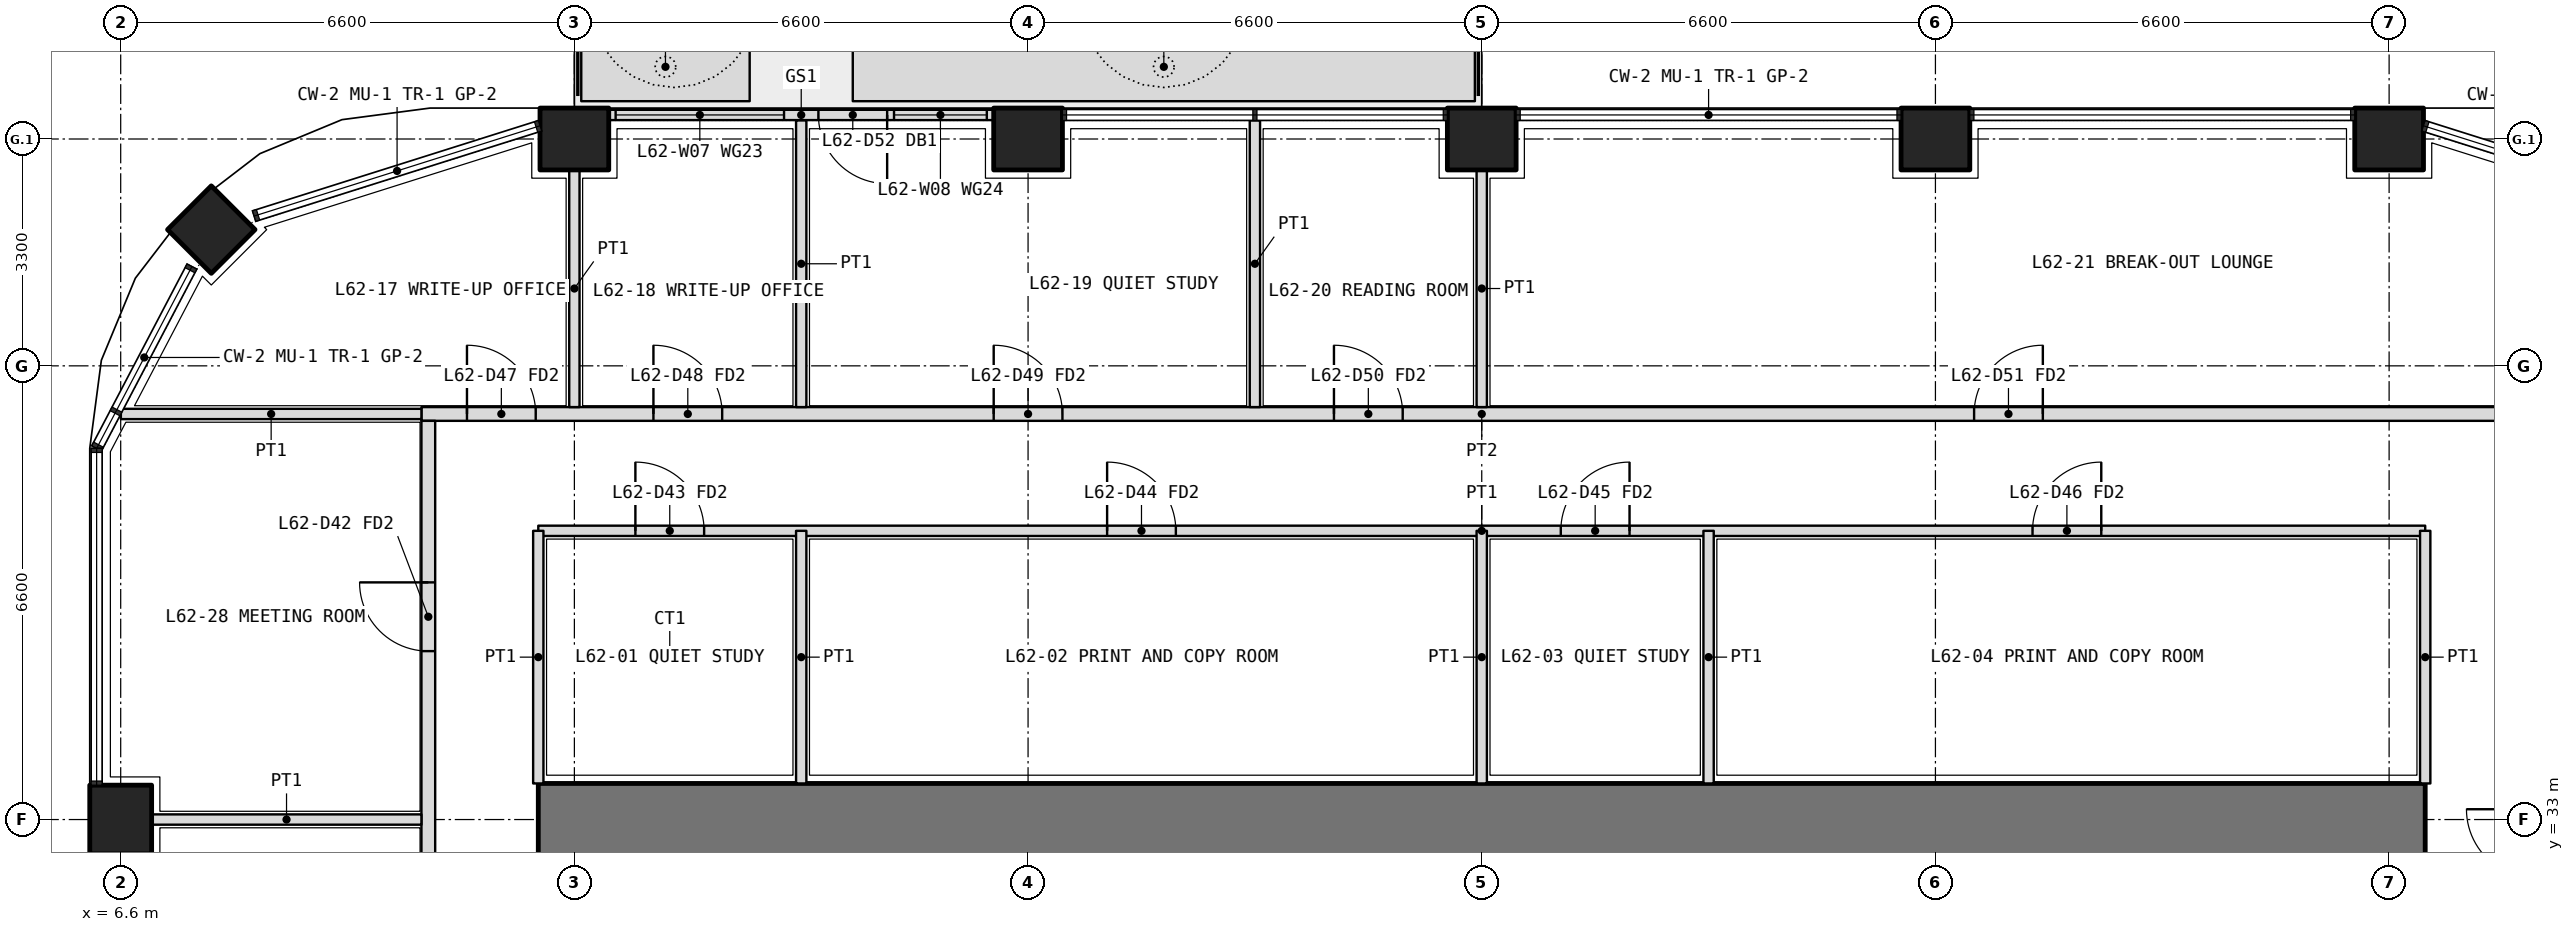
"""IFC4 building model, lengths in metres.
Left out: names, types, materials, properties, quantities, classifications, styles, units other than length and angle.
Written with IfcOpenShell. Run it as: python <this file> out.ifc"""

import sys

from ifc_helpers import new_model, si_unit, direction, frame, frame_2d, origin, origin_2d, place, context, subcontext, project, spatial, polyline, rectangle, outline, extrude, element, fill, save


model = new_model("IFC4")
c1 = context("Model", 3, precision=1e-05, world=origin(), true_north=direction((0.0, 1.0)))
c2 = subcontext(c1, "Body", "Model", "MODEL_VIEW")
j1 = project(units=[si_unit("LENGTHUNIT", "METRE"), si_unit("PLANEANGLEUNIT", "RADIAN")], contexts=[c1])
p1 = place(None, origin())
s1 = spatial("IfcSite", under=j1, at=p1, CompositionType="ELEMENT")
p2 = place(p1, origin())
s2 = spatial("IfcBuilding", under=s1, at=p2, CompositionType="ELEMENT")
p3 = place(p2, frame((0.0, 0.0, 271.2)))
s3 = spatial("IfcBuildingStorey", under=s2, at=p3, CompositionType="ELEMENT", Elevation=271.2)
p4 = place(p3, frame((7.918, 41.582, 0.0), z_axis=(0.0, 0.0, 1.0), x_axis=(0.707106781187, 0.707106781187, 0.0)))
e1 = element("IfcColumn", 1, at=p4, inside=s3, PredefinedType="COLUMN", context=c2, shape_type="SweptSolid", body=[
    extrude(rectangle(XDim=0.9, YDim=0.9, at=origin_2d()), origin(), (0.0, 0.0, 1.0), 4.2),
])
for number, where, z_axis, x_axis in (
    (2, (6.6, 33.0, 0.0), (0.0, 0.0, 1.0), (0.0, 1.0, 0.0)),
    (3, (13.2, 42.9, 0.0), (0.0, 0.0, 1.0), (1.0, 0.0, 0.0)),
    (4, (19.8, 42.9, 0.0), (0.0, 0.0, 1.0), (1.0, 0.0, 0.0)),
    (5, (26.4, 42.9, 0.0), (0.0, 0.0, 1.0), (1.0, 0.0, 0.0)),
    (6, (33.0, 42.9, 0.0), (0.0, 0.0, 1.0), (1.0, 0.0, 0.0)),
    (7, (39.6, 42.9, 0.0), (0.0, 0.0, 1.0), (1.0, 0.0, 0.0)),
):
    element("IfcColumn", number, at=place(p3, frame(where, z_axis=z_axis, x_axis=x_axis)), inside=s3, PredefinedType="COLUMN", context=c2, shape_type="SweptSolid", body=[
        extrude(rectangle(XDim=1.0, YDim=0.9, at=origin_2d()), origin(), (0.0, 0.0, 1.0), 4.2),
    ])
p5 = place(p3, origin())
e8 = element("IfcWall", 8, at=p5, inside=s3, PredefinedType="USERDEFINED", context=c2, shape_type="SweptSolid", body=[
    extrude(outline(polyline([(13.3, 43.45), (15.75, 43.45), (15.75, 44.45), (13.3, 44.45), (13.3, 43.45)]), holes=[polyline([(13.45, 43.6), (15.6, 43.6), (15.6, 44.3), (13.45, 44.3), (13.45, 43.6)])]), origin(), (0.0, 0.0, 1.0), 1.05),
])
p6 = place(p3, origin())
e9 = element("IfcWall", 9, at=p6, inside=s3, PredefinedType="USERDEFINED", context=c2, shape_type="SweptSolid", body=[
    extrude(outline(polyline([(17.25, 43.45), (26.3, 43.45), (26.3, 44.45), (17.25, 44.45), (17.25, 43.45)]), holes=[polyline([(17.4, 43.6), (26.15, 43.6), (26.15, 44.3), (17.4, 44.3), (17.4, 43.6)])]), origin(), (0.0, 0.0, 1.0), 1.05),
])
p7 = place(p3, frame((19.3, 43.25, 0.0), z_axis=(0.0, 0.0, 1.0), x_axis=(-1.0, 0.0, 0.0)))
e10 = element("IfcWall", 10, at=p7, inside=s3, PredefinedType="SOLIDWALL", context=c2, shape_type="SweptSolid", body=[
    extrude(rectangle(XDim=5.6, YDim=0.15, at=frame_2d((2.8, 0.0))), origin(), (0.0, 0.0, 1.0), 2.7),
])
p8 = place(p7, frame((1.55, 0.0, 0.0)))
e11 = element("IfcOpeningElement", 11, at=p8, cuts=e10, PredefinedType="OPENING", context=c2, shape_type="SweptSolid", body=[
    extrude(rectangle(XDim=1.0, YDim=2.4, at=frame_2d((0.5, 1.2))), frame((0.0, 0.085, 0.0), z_axis=(0.0, -1.0, 0.0), x_axis=(1.0, 0.0, 0.0)), (0.0, 0.0, 1.0), 0.17),
])
p9 = place(p7, frame((0.1, 0.0, 0.1)))
e12 = element("IfcOpeningElement", 12, at=p9, cuts=e10, PredefinedType="OPENING", context=c2, shape_type="SweptSolid", body=[
    extrude(rectangle(XDim=1.35, YDim=2.3, at=frame_2d((0.675, 1.15))), frame((0.0, 0.085, 0.0), z_axis=(0.0, -1.0, 0.0), x_axis=(1.0, 0.0, 0.0)), (0.0, 0.0, 1.0), 0.17),
])
p10 = place(p7, frame((3.05, 0.0, 0.1)))
e13 = element("IfcOpeningElement", 13, at=p10, cuts=e10, PredefinedType="OPENING", context=c2, shape_type="SweptSolid", body=[
    extrude(rectangle(XDim=2.45, YDim=2.3, at=frame_2d((1.225, 1.15))), frame((0.0, 0.085, 0.0), z_axis=(0.0, -1.0, 0.0), x_axis=(1.0, 0.0, 0.0)), (0.0, 0.0, 1.0), 0.17),
])
p11 = place(p3, frame((40.125, 33.0, 0.0), z_axis=(0.0, 0.0, 1.0), x_axis=(-1.0, 0.0, 0.0)))
e14 = element("IfcWall", 14, at=p11, inside=s3, PredefinedType="SHEAR", context=c2, shape_type="SweptSolid", body=[
    extrude(rectangle(XDim=27.45, YDim=1.05, at=frame_2d((13.725, 0.0))), origin(), (0.0, 0.0, 1.0), 4.2),
])
p12 = place(p3, frame((12.675, 37.2, 0.0), z_axis=(0.0, 0.0, 1.0), x_axis=(1.0, 0.0, 0.0)))
e15 = element("IfcWall", 15, at=p12, inside=s3, PredefinedType="PARTITIONING", context=c2, shape_type="SweptSolid", body=[
    extrude(rectangle(XDim=27.45, YDim=0.15, at=frame_2d((13.725, 0.0))), origin(), (0.0, 0.0, 1.0), 3.0),
])
p13 = place(p12, frame((1.413, 0.0, 0.0)))
e16 = element("IfcOpeningElement", 16, at=p13, cuts=e15, PredefinedType="OPENING", context=c2, shape_type="SweptSolid", body=[
    extrude(rectangle(XDim=1.0, YDim=2.1, at=frame_2d((0.5, 1.05))), frame((0.0, 0.085, 0.0), z_axis=(0.0, -1.0, 0.0), x_axis=(1.0, 0.0, 0.0)), (0.0, 0.0, 1.0), 0.17),
])
p14 = place(p12, frame((8.275, 0.0, 0.0)))
e17 = element("IfcOpeningElement", 17, at=p14, cuts=e15, PredefinedType="OPENING", context=c2, shape_type="SweptSolid", body=[
    extrude(rectangle(XDim=1.0, YDim=2.1, at=frame_2d((0.5, 1.05))), frame((0.0, 0.085, 0.0), z_axis=(0.0, -1.0, 0.0), x_axis=(1.0, 0.0, 0.0)), (0.0, 0.0, 1.0), 0.17),
])
p15 = place(p12, frame((14.875, 0.0, 0.0)))
e18 = element("IfcOpeningElement", 18, at=p15, cuts=e15, PredefinedType="OPENING", context=c2, shape_type="SweptSolid", body=[
    extrude(rectangle(XDim=1.0, YDim=2.1, at=frame_2d((0.5, 1.05))), frame((0.0, 0.085, 0.0), z_axis=(0.0, -1.0, 0.0), x_axis=(1.0, 0.0, 0.0)), (0.0, 0.0, 1.0), 0.17),
])
p16 = place(p12, frame((21.738, 0.0, 0.0)))
e19 = element("IfcOpeningElement", 19, at=p16, cuts=e15, PredefinedType="OPENING", context=c2, shape_type="SweptSolid", body=[
    extrude(rectangle(XDim=1.0, YDim=2.1, at=frame_2d((0.5, 1.05))), frame((0.0, 0.085, 0.0), z_axis=(0.0, -1.0, 0.0), x_axis=(1.0, 0.0, 0.0)), (0.0, 0.0, 1.0), 0.17),
])
for number, where, z_axis, x_axis in (
    (20, (12.675, 33.525, 0.0), (0.0, 0.0, 1.0), (0.0, 1.0, 0.0)),
    (21, (40.125, 33.525, 0.0), (0.0, 0.0, 1.0), (0.0, 1.0, 0.0)),
):
    element("IfcWall", number, at=place(p3, frame(where, z_axis=z_axis, x_axis=x_axis)), inside=s3, PredefinedType="PARTITIONING", context=c2, shape_type="SweptSolid", body=[
        extrude(rectangle(XDim=3.675, YDim=0.15, at=frame_2d((1.837, 0.0))), origin(), (0.0, 0.0, 1.0), 3.0),
    ])
p17 = place(p3, frame((16.5, 33.525, 0.0), z_axis=(0.0, 0.0, 1.0), x_axis=(0.0, 1.0, 0.0)))
e22 = element("IfcWall", 22, at=p17, inside=s3, PredefinedType="PARTITIONING", context=c2, shape_type="SweptSolid", body=[
    extrude(rectangle(XDim=3.675, YDim=0.15, at=frame_2d((1.837, 0.0))), origin(), (0.0, 0.0, 1.0), 3.9),
])
p18 = place(p3, frame((26.4, 33.525, 0.0), z_axis=(0.0, 0.0, 1.0), x_axis=(0.0, 1.0, 0.0)))
e23 = element("IfcWall", 23, at=p18, inside=s3, PredefinedType="PARTITIONING", context=c2, shape_type="SweptSolid", body=[
    extrude(rectangle(XDim=3.675, YDim=0.15, at=frame_2d((1.837, 0.0))), origin(), (0.0, 0.0, 1.0), 3.0),
])
p19 = place(p3, frame((29.7, 33.525, 0.0), z_axis=(0.0, 0.0, 1.0), x_axis=(0.0, 1.0, 0.0)))
e24 = element("IfcWall", 24, at=p19, inside=s3, PredefinedType="PARTITIONING", context=c2, shape_type="SweptSolid", body=[
    extrude(rectangle(XDim=3.675, YDim=0.15, at=frame_2d((1.837, 0.0))), origin(), (0.0, 0.0, 1.0), 3.9),
])
p20 = place(p3, frame((10.975, 38.9, 0.0), z_axis=(0.0, 0.0, 1.0), x_axis=(1.0, 0.0, 0.0)))
e25 = element("IfcWall", 25, at=p20, inside=s3, PredefinedType="PARTITIONING", context=c2, shape_type="SweptSolid", body=[
    extrude(rectangle(XDim=30.85, YDim=0.2, at=frame_2d((15.425, 0.0))), origin(), (0.0, 0.0, 1.0), 3.0),
])
p21 = place(p20, frame((0.663, 0.0, 0.0)))
e26 = element("IfcOpeningElement", 26, at=p21, cuts=e25, PredefinedType="OPENING", context=c2, shape_type="SweptSolid", body=[
    extrude(rectangle(XDim=1.0, YDim=2.1, at=frame_2d((0.5, 1.05))), frame((0.0, 0.11, 0.0), z_axis=(0.0, -1.0, 0.0), x_axis=(1.0, 0.0, 0.0)), (0.0, 0.0, 1.0), 0.22),
])
p22 = place(p20, frame((3.375, 0.0, 0.0)))
e27 = element("IfcOpeningElement", 27, at=p22, cuts=e25, PredefinedType="OPENING", context=c2, shape_type="SweptSolid", body=[
    extrude(rectangle(XDim=1.0, YDim=2.1, at=frame_2d((0.5, 1.05))), frame((0.0, 0.11, 0.0), z_axis=(0.0, -1.0, 0.0), x_axis=(1.0, 0.0, 0.0)), (0.0, 0.0, 1.0), 0.22),
])
p23 = place(p20, frame((8.325, 0.0, 0.0)))
e28 = element("IfcOpeningElement", 28, at=p23, cuts=e25, PredefinedType="OPENING", context=c2, shape_type="SweptSolid", body=[
    extrude(rectangle(XDim=1.0, YDim=2.1, at=frame_2d((0.5, 1.05))), frame((0.0, 0.11, 0.0), z_axis=(0.0, -1.0, 0.0), x_axis=(1.0, 0.0, 0.0)), (0.0, 0.0, 1.0), 0.22),
])
p24 = place(p20, frame((13.275, 0.0, 0.0)))
e29 = element("IfcOpeningElement", 29, at=p24, cuts=e25, PredefinedType="OPENING", context=c2, shape_type="SweptSolid", body=[
    extrude(rectangle(XDim=1.0, YDim=2.1, at=frame_2d((0.5, 1.05))), frame((0.0, 0.11, 0.0), z_axis=(0.0, -1.0, 0.0), x_axis=(1.0, 0.0, 0.0)), (0.0, 0.0, 1.0), 0.22),
])
p25 = place(p20, frame((22.587, 0.0, 0.0)))
e30 = element("IfcOpeningElement", 30, at=p25, cuts=e25, PredefinedType="OPENING", context=c2, shape_type="SweptSolid", body=[
    extrude(rectangle(XDim=1.0, YDim=2.1, at=frame_2d((0.5, 1.05))), frame((0.0, 0.11, 0.0), z_axis=(0.0, -1.0, 0.0), x_axis=(1.0, 0.0, 0.0)), (0.0, 0.0, 1.0), 0.22),
])
p26 = place(p3, frame((11.075, 7.4, 0.0), z_axis=(0.0, 0.0, 1.0), x_axis=(0.0, 1.0, 0.0)))
e31 = element("IfcWall", 31, at=p26, inside=s3, PredefinedType="PARTITIONING", context=c2, shape_type="SweptSolid", body=[
    extrude(rectangle(XDim=31.4, YDim=0.2, at=frame_2d((15.7, 0.0))), origin(), (0.0, 0.0, 1.0), 3.0),
])
p27 = place(p26, frame((2.35, 0.0, 0.0)))
e32 = element("IfcOpeningElement", 32, at=p27, cuts=e31, PredefinedType="OPENING", context=c2, shape_type="SweptSolid", body=[
    extrude(rectangle(XDim=1.0, YDim=2.1, at=frame_2d((0.5, 1.05))), frame((0.0, 0.11, 0.0), z_axis=(0.0, -1.0, 0.0), x_axis=(1.0, 0.0, 0.0)), (0.0, 0.0, 1.0), 0.22),
])
p28 = place(p26, frame((6.9, 0.0, 0.0)))
e33 = element("IfcOpeningElement", 33, at=p28, cuts=e31, PredefinedType="OPENING", context=c2, shape_type="SweptSolid", body=[
    extrude(rectangle(XDim=1.0, YDim=2.1, at=frame_2d((0.5, 1.05))), frame((0.0, 0.11, 0.0), z_axis=(0.0, -1.0, 0.0), x_axis=(1.0, 0.0, 0.0)), (0.0, 0.0, 1.0), 0.22),
])
p29 = place(p26, frame((10.35, 0.0, 0.0)))
e34 = element("IfcOpeningElement", 34, at=p29, cuts=e31, PredefinedType="OPENING", context=c2, shape_type="SweptSolid", body=[
    extrude(rectangle(XDim=0.9, YDim=2.1, at=frame_2d((0.45, 1.05))), frame((0.0, 0.11, 0.0), z_axis=(0.0, -1.0, 0.0), x_axis=(1.0, 0.0, 0.0)), (0.0, 0.0, 1.0), 0.22),
])
p30 = place(p26, frame((13.7, 0.0, 0.0)))
e35 = element("IfcOpeningElement", 35, at=p30, cuts=e31, PredefinedType="OPENING", context=c2, shape_type="SweptSolid", body=[
    extrude(rectangle(XDim=0.9, YDim=2.1, at=frame_2d((0.45, 1.05))), frame((0.0, 0.11, 0.0), z_axis=(0.0, -1.0, 0.0), x_axis=(1.0, 0.0, 0.0)), (0.0, 0.0, 1.0), 0.22),
])
p31 = place(p26, frame((18.5, 0.0, 0.0)))
e36 = element("IfcOpeningElement", 36, at=p31, cuts=e31, PredefinedType="OPENING", context=c2, shape_type="SweptSolid", body=[
    extrude(rectangle(XDim=1.0, YDim=2.1, at=frame_2d((0.5, 1.05))), frame((0.0, 0.11, 0.0), z_axis=(0.0, -1.0, 0.0), x_axis=(1.0, 0.0, 0.0)), (0.0, 0.0, 1.0), 0.22),
])
p32 = place(p26, frame((23.45, 0.0, 0.0)))
e37 = element("IfcOpeningElement", 37, at=p32, cuts=e31, PredefinedType="OPENING", context=c2, shape_type="SweptSolid", body=[
    extrude(rectangle(XDim=1.0, YDim=2.1, at=frame_2d((0.5, 1.05))), frame((0.0, 0.11, 0.0), z_axis=(0.0, -1.0, 0.0), x_axis=(1.0, 0.0, 0.0)), (0.0, 0.0, 1.0), 0.22),
])
p33 = place(p26, frame((28.05, 0.0, 0.0)))
e38 = element("IfcOpeningElement", 38, at=p33, cuts=e31, PredefinedType="OPENING", context=c2, shape_type="SweptSolid", body=[
    extrude(rectangle(XDim=1.0, YDim=2.1, at=frame_2d((0.5, 1.05))), frame((0.0, 0.11, 0.0), z_axis=(0.0, -1.0, 0.0), x_axis=(1.0, 0.0, 0.0)), (0.0, 0.0, 1.0), 0.22),
])
p34 = place(p3, frame((6.603, 38.9, 0.0), z_axis=(0.0, 0.0, 1.0), x_axis=(1.0, 0.0, 0.0)))
e39 = element("IfcWall", 39, at=p34, inside=s3, PredefinedType="PARTITIONING", context=c2, shape_type="SweptSolid", body=[
    extrude(rectangle(XDim=4.373, YDim=0.15, at=frame_2d((2.186, 0.0))), origin(), (0.0, 0.0, 1.0), 2.7),
])
p35 = place(p3, frame((13.2, 42.45, 0.0), z_axis=(0.0, 0.0, 1.0), x_axis=(0.0, -1.0, 0.0)))
e40 = element("IfcWall", 40, at=p35, inside=s3, PredefinedType="PARTITIONING", context=c2, shape_type="SweptSolid", body=[
    extrude(rectangle(XDim=3.45, YDim=0.15, at=frame_2d((1.725, 0.0))), origin(), (0.0, 0.0, 1.0), 3.0),
])
for number, where, z_axis, x_axis in (
    (41, (16.5, 43.17, 0.0), (0.0, 0.0, 1.0), (0.0, -1.0, 0.0)),
    (42, (23.1, 43.17, 0.0), (0.0, 0.0, 1.0), (0.0, -1.0, 0.0)),
):
    element("IfcWall", number, at=place(p3, frame(where, z_axis=z_axis, x_axis=x_axis)), inside=s3, PredefinedType="PARTITIONING", context=c2, shape_type="SweptSolid", body=[
        extrude(rectangle(XDim=4.17, YDim=0.15, at=frame_2d((2.085, 0.0))), origin(), (0.0, 0.0, 1.0), 2.7),
    ])
p36 = place(p3, frame((26.4, 42.45, 0.0), z_axis=(0.0, 0.0, 1.0), x_axis=(0.0, -1.0, 0.0)))
e43 = element("IfcWall", 43, at=p36, inside=s3, PredefinedType="PARTITIONING", context=c2, shape_type="SweptSolid", body=[
    extrude(rectangle(XDim=3.45, YDim=0.15, at=frame_2d((1.725, 0.0))), origin(), (0.0, 0.0, 1.0), 3.0),
])
p37 = place(p3, frame((7.05, 33.0, 0.0), z_axis=(0.0, 0.0, 1.0), x_axis=(1.0, 0.0, 0.0)))
e44 = element("IfcWall", 44, at=p37, inside=s3, PredefinedType="PARTITIONING", context=c2, shape_type="SweptSolid", body=[
    extrude(rectangle(XDim=3.925, YDim=0.15, at=frame_2d((1.962, 0.0))), origin(), (0.0, 0.0, 1.0), 3.0),
])
p38 = place(p8, origin())
e45 = element("IfcDoor", 45, at=p38, inside=s3, OperationType="SINGLE_SWING_LEFT", PredefinedType="DOOR", context=c2, shape_type="SweptSolid", body=[
    extrude(rectangle(XDim=1.0, YDim=2.4, at=frame_2d((0.5, 1.2))), frame((0.0, 0.025, 0.0), z_axis=(0.0, -1.0, 0.0), x_axis=(1.0, 0.0, 0.0)), (0.0, 0.0, 1.0), 0.05),
])
fill(e11, e45)
p39 = place(p9, origin())
e46 = element("IfcWindow", 46, at=p39, inside=s3, PartitioningType="SINGLE_PANEL", PredefinedType="WINDOW", context=c2, shape_type="SweptSolid", body=[
    extrude(rectangle(XDim=1.35, YDim=2.3, at=frame_2d((0.675, 1.15))), frame((0.0, 0.03, 0.0), z_axis=(0.0, -1.0, 0.0), x_axis=(1.0, 0.0, 0.0)), (0.0, 0.0, 1.0), 0.06),
])
fill(e12, e46)
p40 = place(p10, origin())
e47 = element("IfcWindow", 47, at=p40, inside=s3, PartitioningType="SINGLE_PANEL", PredefinedType="WINDOW", context=c2, shape_type="SweptSolid", body=[
    extrude(rectangle(XDim=2.45, YDim=2.3, at=frame_2d((1.225, 1.15))), frame((0.0, 0.03, 0.0), z_axis=(0.0, -1.0, 0.0), x_axis=(1.0, 0.0, 0.0)), (0.0, 0.0, 1.0), 0.06),
])
fill(e13, e47)
p41 = place(p13, origin())
e48 = element("IfcDoor", 48, at=p41, inside=s3, OperationType="SINGLE_SWING_LEFT", PredefinedType="DOOR", context=c2, shape_type="SweptSolid", body=[
    extrude(rectangle(XDim=1.0, YDim=2.1, at=frame_2d((0.5, 1.05))), frame((0.0, 0.025, 0.0), z_axis=(0.0, -1.0, 0.0), x_axis=(1.0, 0.0, 0.0)), (0.0, 0.0, 1.0), 0.05),
])
fill(e16, e48)
p42 = place(p14, origin())
e49 = element("IfcDoor", 49, at=p42, inside=s3, OperationType="SINGLE_SWING_LEFT", PredefinedType="DOOR", context=c2, shape_type="SweptSolid", body=[
    extrude(rectangle(XDim=1.0, YDim=2.1, at=frame_2d((0.5, 1.05))), frame((0.0, 0.025, 0.0), z_axis=(0.0, -1.0, 0.0), x_axis=(1.0, 0.0, 0.0)), (0.0, 0.0, 1.0), 0.05),
])
fill(e17, e49)
p43 = place(p15, origin())
e50 = element("IfcDoor", 50, at=p43, inside=s3, OperationType="SINGLE_SWING_RIGHT", PredefinedType="DOOR", context=c2, shape_type="SweptSolid", body=[
    extrude(rectangle(XDim=1.0, YDim=2.1, at=frame_2d((0.5, 1.05))), frame((0.0, 0.025, 0.0), z_axis=(0.0, -1.0, 0.0), x_axis=(1.0, 0.0, 0.0)), (0.0, 0.0, 1.0), 0.05),
])
fill(e18, e50)
p44 = place(p16, origin())
e51 = element("IfcDoor", 51, at=p44, inside=s3, OperationType="SINGLE_SWING_RIGHT", PredefinedType="DOOR", context=c2, shape_type="SweptSolid", body=[
    extrude(rectangle(XDim=1.0, YDim=2.1, at=frame_2d((0.5, 1.05))), frame((0.0, 0.025, 0.0), z_axis=(0.0, -1.0, 0.0), x_axis=(1.0, 0.0, 0.0)), (0.0, 0.0, 1.0), 0.05),
])
fill(e19, e51)
p45 = place(p21, origin())
e52 = element("IfcDoor", 52, at=p45, inside=s3, OperationType="SINGLE_SWING_LEFT", PredefinedType="DOOR", context=c2, shape_type="SweptSolid", body=[
    extrude(rectangle(XDim=1.0, YDim=2.1, at=frame_2d((0.5, 1.05))), frame((0.0, 0.025, 0.0), z_axis=(0.0, -1.0, 0.0), x_axis=(1.0, 0.0, 0.0)), (0.0, 0.0, 1.0), 0.05),
])
fill(e26, e52)
p46 = place(p22, origin())
e53 = element("IfcDoor", 53, at=p46, inside=s3, OperationType="SINGLE_SWING_LEFT", PredefinedType="DOOR", context=c2, shape_type="SweptSolid", body=[
    extrude(rectangle(XDim=1.0, YDim=2.1, at=frame_2d((0.5, 1.05))), frame((0.0, 0.025, 0.0), z_axis=(0.0, -1.0, 0.0), x_axis=(1.0, 0.0, 0.0)), (0.0, 0.0, 1.0), 0.05),
])
fill(e27, e53)
p47 = place(p23, origin())
e54 = element("IfcDoor", 54, at=p47, inside=s3, OperationType="SINGLE_SWING_LEFT", PredefinedType="DOOR", context=c2, shape_type="SweptSolid", body=[
    extrude(rectangle(XDim=1.0, YDim=2.1, at=frame_2d((0.5, 1.05))), frame((0.0, 0.025, 0.0), z_axis=(0.0, -1.0, 0.0), x_axis=(1.0, 0.0, 0.0)), (0.0, 0.0, 1.0), 0.05),
])
fill(e28, e54)
p48 = place(p24, origin())
e55 = element("IfcDoor", 55, at=p48, inside=s3, OperationType="SINGLE_SWING_LEFT", PredefinedType="DOOR", context=c2, shape_type="SweptSolid", body=[
    extrude(rectangle(XDim=1.0, YDim=2.1, at=frame_2d((0.5, 1.05))), frame((0.0, 0.025, 0.0), z_axis=(0.0, -1.0, 0.0), x_axis=(1.0, 0.0, 0.0)), (0.0, 0.0, 1.0), 0.05),
])
fill(e29, e55)
p49 = place(p25, origin())
e56 = element("IfcDoor", 56, at=p49, inside=s3, OperationType="SINGLE_SWING_RIGHT", PredefinedType="DOOR", context=c2, shape_type="SweptSolid", body=[
    extrude(rectangle(XDim=1.0, YDim=2.1, at=frame_2d((0.5, 1.05))), frame((0.0, 0.025, 0.0), z_axis=(0.0, -1.0, 0.0), x_axis=(1.0, 0.0, 0.0)), (0.0, 0.0, 1.0), 0.05),
])
fill(e30, e56)
p50 = place(p33, origin())
e57 = element("IfcDoor", 57, at=p50, inside=s3, OperationType="SINGLE_SWING_RIGHT", PredefinedType="DOOR", context=c2, shape_type="SweptSolid", body=[
    extrude(rectangle(XDim=1.0, YDim=2.1, at=frame_2d((0.5, 1.05))), frame((0.0, 0.025, 0.0), z_axis=(0.0, -1.0, 0.0), x_axis=(1.0, 0.0, 0.0)), (0.0, 0.0, 1.0), 0.05),
])
fill(e38, e57)
save(model, sys.argv[1])
